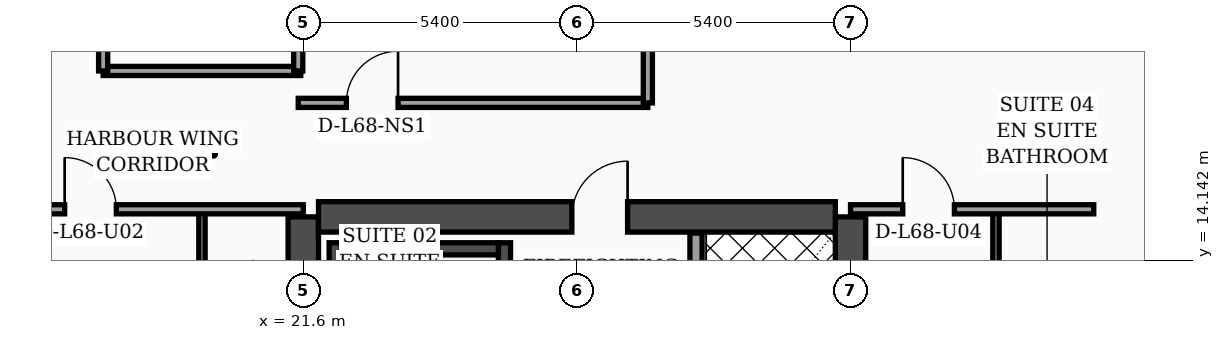
"""IFC4 building model, lengths in metres.
Left out: names, types, materials, properties, quantities, classifications, styles, units other than length and angle.
Written with IfcOpenShell. Run it as: python <this file> out.ifc"""

import sys

from ifc_helpers import new_model, si_unit, direction, frame, frame_2d, origin, place, context, subcontext, project, spatial, rectangle, extrude, element, fill, save


model = new_model("IFC4")
c1 = context("Model", 3, precision=1e-05, world=origin(), true_north=direction((0.0, 1.0)))
c2 = subcontext(c1, "Body", "Model", "MODEL_VIEW")
j1 = project(units=[si_unit("LENGTHUNIT", "METRE"), si_unit("PLANEANGLEUNIT", "RADIAN")], contexts=[c1])
p1 = place(None, origin())
s1 = spatial("IfcSite", under=j1, at=p1, CompositionType="ELEMENT")
p2 = place(p1, origin())
s2 = spatial("IfcBuilding", under=s1, at=p2, CompositionType="ELEMENT")
p3 = place(p2, frame((0.0, 0.0, 274.9)))
s3 = spatial("IfcBuildingStorey", under=s2, at=p3, CompositionType="ELEMENT", Elevation=274.9)
for number, where, z_axis, x_axis in (
    (1, (21.6, 4.6, 0.0), (0.0, 0.0, 1.0), (0.0, 1.0, 0.0)),
    (2, (32.4, 4.6, 0.0), (0.0, 0.0, 1.0), (0.0, 1.0, 0.0)),
):
    element("IfcWall", number, at=place(p3, frame(where, z_axis=z_axis, x_axis=x_axis)), inside=s3, PredefinedType="SHEAR", context=c2, shape_type="SweptSolid", body=[
        extrude(rectangle(XDim=10.4, YDim=0.6, at=frame_2d((5.2, 0.0))), origin(), (0.0, 0.0, 1.0), 3.56),
    ])
p4 = place(p3, frame((21.9, 15.0, 0.0), z_axis=(0.0, 0.0, 1.0), x_axis=(1.0, 0.0, 0.0)))
e3 = element("IfcWall", 3, at=p4, inside=s3, PredefinedType="SHEAR", context=c2, shape_type="SweptSolid", body=[
    extrude(rectangle(XDim=10.2, YDim=0.6, at=frame_2d((5.1, 0.0))), origin(), (0.0, 0.0, 1.0), 3.56),
])
p5 = place(p4, frame((5.0, 0.0, 0.0)))
e4 = element("IfcOpeningElement", 4, at=p5, cuts=e3, PredefinedType="OPENING", context=c2, shape_type="SweptSolid", body=[
    extrude(rectangle(XDim=1.1, YDim=2.2, at=frame_2d((0.55, 1.1))), frame((0.0, 0.31, 0.0), z_axis=(0.0, -1.0, 0.0), x_axis=(1.0, 0.0, 0.0)), (0.0, 0.0, 1.0), 0.62),
])
p6 = place(p3, frame((22.23, 4.9, 0.0), z_axis=(0.0, 0.0, 1.0), x_axis=(0.0, 1.0, 0.0)))
e5 = element("IfcWall", 5, at=p6, inside=s3, PredefinedType="SOLIDWALL", context=c2, shape_type="SweptSolid", body=[
    extrude(rectangle(XDim=9.59, YDim=0.24, at=frame_2d((4.795, 0.0))), origin(), (0.0, 0.0, 1.0), 3.56),
])
p7 = place(p3, frame((25.57, 4.9, 0.0), z_axis=(0.0, 0.0, 1.0), x_axis=(0.0, 1.0, 0.0)))
e6 = element("IfcWall", 6, at=p7, inside=s3, PredefinedType="SOLIDWALL", context=c2, shape_type="SweptSolid", body=[
    extrude(rectangle(XDim=9.59, YDim=0.24, at=frame_2d((4.795, 0.0))), origin(), (0.0, 0.0, 1.0), 3.56),
])
p8 = place(p7, frame((0.35, 0.0, 0.0)))
e7 = element("IfcOpeningElement", 7, at=p8, cuts=e6, PredefinedType="OPENING", context=c2, shape_type="SweptSolid", body=[
    extrude(rectangle(XDim=1.15, YDim=2.2, at=frame_2d((0.575, 1.1))), frame((0.0, 0.13, 0.0), z_axis=(0.0, -1.0, 0.0), x_axis=(1.0, 0.0, 0.0)), (0.0, 0.0, 1.0), 0.26),
])
p9 = place(p3, frame((22.35, 14.37, 0.0), z_axis=(0.0, 0.0, 1.0), x_axis=(1.0, 0.0, 0.0)))
e8 = element("IfcWall", 8, at=p9, inside=s3, PredefinedType="SOLIDWALL", context=c2, shape_type="SweptSolid", body=[
    extrude(rectangle(XDim=3.1, YDim=0.24, at=frame_2d((1.55, 0.0))), origin(), (0.0, 0.0, 1.0), 3.56),
])
p10 = place(p3, frame((43.83, 5.505, 0.0), z_axis=(0.0, 0.0, 1.0), x_axis=(-0.300509063924, 0.953778958931, 0.0)))
e9 = element("IfcWall", 9, at=p10, inside=s3, PredefinedType="SOLIDWALL", context=c2, shape_type="SweptSolid", body=[
    extrude(rectangle(XDim=30.814, YDim=0.32, at=frame_2d((15.407, 0.0))), origin(), (0.0, 0.0, 1.0), 3.56),
])
p11 = place(p10, frame((10.199, 0.0, 0.0)))
e10 = element("IfcOpeningElement", 10, at=p11, cuts=e9, PredefinedType="OPENING", context=c2, shape_type="SweptSolid", body=[
    extrude(rectangle(XDim=1.4, YDim=2.25, at=frame_2d((0.7, 1.125))), frame((0.0, 0.17, 0.0), z_axis=(0.0, -1.0, 0.0), x_axis=(1.0, 0.0, 0.0)), (0.0, 0.0, 1.0), 0.34),
])
p12 = place(p10, frame((4.437, 0.0, 0.7)))
e11 = element("IfcOpeningElement", 11, at=p12, cuts=e9, PredefinedType="OPENING", context=c2, shape_type="SweptSolid", body=[
    extrude(rectangle(XDim=1.6, YDim=1.65, at=frame_2d((0.8, 0.825))), frame((0.0, 0.17, 0.0), z_axis=(0.0, -1.0, 0.0), x_axis=(1.0, 0.0, 0.0)), (0.0, 0.0, 1.0), 0.34),
])
p13 = place(p10, frame((18.696, 0.0, 0.7)))
e12 = element("IfcOpeningElement", 12, at=p13, cuts=e9, PredefinedType="OPENING", context=c2, shape_type="SweptSolid", body=[
    extrude(rectangle(XDim=1.6, YDim=1.65, at=frame_2d((0.8, 0.825))), frame((0.0, 0.17, 0.0), z_axis=(0.0, -1.0, 0.0), x_axis=(1.0, 0.0, 0.0)), (0.0, 0.0, 1.0), 0.34),
])
p14 = place(p10, frame((1.6, 0.0, 0.75)))
e13 = element("IfcOpeningElement", 13, at=p14, cuts=e9, PredefinedType="OPENING", context=c2, shape_type="SweptSolid", body=[
    extrude(rectangle(XDim=1.5, YDim=1.6, at=frame_2d((0.75, 0.8))), frame((0.0, 0.17, 0.0), z_axis=(0.0, -1.0, 0.0), x_axis=(1.0, 0.0, 0.0)), (0.0, 0.0, 1.0), 0.34),
])
p15 = place(p10, frame((7.8, 0.0, 0.75)))
e14 = element("IfcOpeningElement", 14, at=p15, cuts=e9, PredefinedType="OPENING", context=c2, shape_type="SweptSolid", body=[
    extrude(rectangle(XDim=1.5, YDim=1.6, at=frame_2d((0.75, 0.8))), frame((0.0, 0.17, 0.0), z_axis=(0.0, -1.0, 0.0), x_axis=(1.0, 0.0, 0.0)), (0.0, 0.0, 1.0), 0.34),
])
p16 = place(p10, frame((14.0, 0.0, 0.75)))
e15 = element("IfcOpeningElement", 15, at=p16, cuts=e9, PredefinedType="OPENING", context=c2, shape_type="SweptSolid", body=[
    extrude(rectangle(XDim=1.5, YDim=1.6, at=frame_2d((0.75, 0.8))), frame((0.0, 0.17, 0.0), z_axis=(0.0, -1.0, 0.0), x_axis=(1.0, 0.0, 0.0)), (0.0, 0.0, 1.0), 0.34),
])
p17 = place(p10, frame((16.55, 0.0, 0.75)))
e16 = element("IfcOpeningElement", 16, at=p17, cuts=e9, PredefinedType="OPENING", context=c2, shape_type="SweptSolid", body=[
    extrude(rectangle(XDim=1.5, YDim=1.6, at=frame_2d((0.75, 0.8))), frame((0.0, 0.17, 0.0), z_axis=(0.0, -1.0, 0.0), x_axis=(1.0, 0.0, 0.0)), (0.0, 0.0, 1.0), 0.34),
])
p18 = place(p10, frame((20.75, 0.0, 0.75)))
e17 = element("IfcOpeningElement", 17, at=p18, cuts=e9, PredefinedType="OPENING", context=c2, shape_type="SweptSolid", body=[
    extrude(rectangle(XDim=1.5, YDim=1.6, at=frame_2d((0.75, 0.8))), frame((0.0, 0.17, 0.0), z_axis=(0.0, -1.0, 0.0), x_axis=(1.0, 0.0, 0.0)), (0.0, 0.0, 1.0), 0.34),
])
p19 = place(p10, frame((23.3, 0.0, 0.75)))
e18 = element("IfcOpeningElement", 18, at=p19, cuts=e9, PredefinedType="OPENING", context=c2, shape_type="SweptSolid", body=[
    extrude(rectangle(XDim=1.5, YDim=1.6, at=frame_2d((0.75, 0.8))), frame((0.0, 0.17, 0.0), z_axis=(0.0, -1.0, 0.0), x_axis=(1.0, 0.0, 0.0)), (0.0, 0.0, 1.0), 0.34),
])
p20 = place(p10, frame((26.4, 0.0, 0.75)))
e19 = element("IfcOpeningElement", 19, at=p20, cuts=e9, PredefinedType="OPENING", context=c2, shape_type="SweptSolid", body=[
    extrude(rectangle(XDim=1.5, YDim=1.6, at=frame_2d((0.75, 0.8))), frame((0.0, 0.17, 0.0), z_axis=(0.0, -1.0, 0.0), x_axis=(1.0, 0.0, 0.0)), (0.0, 0.0, 1.0), 0.34),
])
p21 = place(p3, frame((29.35, 4.92, 0.0), z_axis=(0.0, 0.0, 1.0), x_axis=(0.0, 1.0, 0.0)))
e20 = element("IfcWall", 20, at=p21, inside=s3, PredefinedType="SOLIDWALL", context=c2, shape_type="SweptSolid", body=[
    extrude(rectangle(XDim=9.76, YDim=0.24, at=frame_2d((4.88, 0.0))), origin(), (0.0, 0.0, 1.0), 3.56),
])
p22 = place(p21, frame((0.55, 0.0, 0.0)))
e21 = element("IfcOpeningElement", 21, at=p22, cuts=e20, PredefinedType="OPENING", context=c2, shape_type="SweptSolid", body=[
    extrude(rectangle(XDim=1.3, YDim=2.35, at=frame_2d((0.65, 1.175))), frame((0.0, 0.13, 0.0), z_axis=(0.0, -1.0, 0.0), x_axis=(1.0, 0.0, 0.0)), (0.0, 0.0, 1.0), 0.26),
])
p23 = place(p3, frame((19.6, 2.44, 0.0), z_axis=(0.0, 0.0, 1.0), x_axis=(0.0, 1.0, 0.0)))
e22 = element("IfcWall", 22, at=p23, inside=s3, PredefinedType="PARTITIONING", context=c2, shape_type="SweptSolid", body=[
    extrude(rectangle(XDim=12.71, YDim=0.125, at=frame_2d((6.355, 0.0))), origin(), (0.0, 0.0, 1.0), 2.59),
])
p24 = place(p23, frame((4.34, 0.0, 0.0)))
e23 = element("IfcOpeningElement", 23, at=p24, cuts=e22, PredefinedType="OPENING", context=c2, shape_type="SweptSolid", body=[
    extrude(rectangle(XDim=0.96, YDim=2.2, at=frame_2d((0.48, 1.1))), frame((0.0, 0.073, 0.0), z_axis=(0.0, -1.0, 0.0), x_axis=(1.0, 0.0, 0.0)), (0.0, 0.0, 1.0), 0.145),
])
p25 = place(p23, frame((10.18, 0.0, 0.0)))
e24 = element("IfcOpeningElement", 24, at=p25, cuts=e22, PredefinedType="OPENING", context=c2, shape_type="SweptSolid", body=[
    extrude(rectangle(XDim=0.9, YDim=2.15, at=frame_2d((0.45, 1.075))), frame((0.0, 0.073, 0.0), z_axis=(0.0, -1.0, 0.0), x_axis=(1.0, 0.0, 0.0)), (0.0, 0.0, 1.0), 0.145),
])
p26 = place(p3, frame((15.15, 15.15, 0.0), z_axis=(0.0, 0.0, 1.0), x_axis=(1.0, 0.0, 0.0)))
e25 = element("IfcWall", 25, at=p26, inside=s3, PredefinedType="PARTITIONING", context=c2, shape_type="SweptSolid", body=[
    extrude(rectangle(XDim=6.45, YDim=0.18, at=frame_2d((3.225, 0.0))), origin(), (0.0, 0.0, 1.0), 2.59),
])
p27 = place(p26, frame((1.74, 0.0, 0.0)))
e26 = element("IfcOpeningElement", 26, at=p27, cuts=e25, PredefinedType="OPENING", context=c2, shape_type="SweptSolid", body=[
    extrude(rectangle(XDim=1.02, YDim=2.2, at=frame_2d((0.51, 1.1))), frame((0.0, 0.1, 0.0), z_axis=(0.0, -1.0, 0.0), x_axis=(1.0, 0.0, 0.0)), (0.0, 0.0, 1.0), 0.2),
])
p28 = place(p3, frame((17.65, 17.88, 0.0), z_axis=(0.0, 0.0, 1.0), x_axis=(1.0, 0.0, 0.0)))
e27 = element("IfcWall", 27, at=p28, inside=s3, PredefinedType="PARTITIONING", context=c2, shape_type="SweptSolid", body=[
    extrude(rectangle(XDim=3.9, YDim=0.18, at=frame_2d((1.95, 0.0))), origin(), (0.0, 0.0, 1.0), 3.56),
])
p29 = place(p3, frame((21.5, 17.88, 0.0), z_axis=(0.0, 0.0, 1.0), x_axis=(0.0, 1.0, 0.0)))
e28 = element("IfcWall", 28, at=p29, inside=s3, PredefinedType="PARTITIONING", context=c2, shape_type="SweptSolid", body=[
    extrude(rectangle(XDim=6.44, YDim=0.18, at=frame_2d((3.22, 0.0))), origin(), (0.0, 0.0, 1.0), 3.09),
])
p30 = place(p3, frame((17.65, 17.88, 0.0), z_axis=(0.0, 0.0, 1.0), x_axis=(0.0, 1.0, 0.0)))
e29 = element("IfcWall", 29, at=p30, inside=s3, PredefinedType="PARTITIONING", context=c2, shape_type="SweptSolid", body=[
    extrude(rectangle(XDim=6.44, YDim=0.18, at=frame_2d((3.22, 0.0))), origin(), (0.0, 0.0, 1.0), 3.09),
])
p31 = place(p30, frame((0.65, 0.0, 0.0)))
e30 = element("IfcOpeningElement", 30, at=p31, cuts=e29, PredefinedType="OPENING", context=c2, shape_type="SweptSolid", body=[
    extrude(rectangle(XDim=0.98, YDim=2.15, at=frame_2d((0.49, 1.075))), frame((0.0, 0.1, 0.0), z_axis=(0.0, -1.0, 0.0), x_axis=(1.0, 0.0, 0.0)), (0.0, 0.0, 1.0), 0.2),
])
p32 = place(p30, frame((3.97, 0.0, 0.0)))
e31 = element("IfcOpeningElement", 31, at=p32, cuts=e29, PredefinedType="OPENING", context=c2, shape_type="SweptSolid", body=[
    extrude(rectangle(XDim=0.96, YDim=2.2, at=frame_2d((0.48, 1.1))), frame((0.0, 0.1, 0.0), z_axis=(0.0, -1.0, 0.0), x_axis=(1.0, 0.0, 0.0)), (0.0, 0.0, 1.0), 0.2),
])
p33 = place(p3, frame((35.27, 2.44, 0.0), z_axis=(0.0, 0.0, 1.0), x_axis=(0.0, 1.0, 0.0)))
e32 = element("IfcWall", 32, at=p33, inside=s3, PredefinedType="PARTITIONING", context=c2, shape_type="SweptSolid", body=[
    extrude(rectangle(XDim=12.71, YDim=0.125, at=frame_2d((6.355, 0.0))), origin(), (0.0, 0.0, 1.0), 2.99),
])
p34 = place(p33, frame((4.35, 0.0, 0.0)))
e33 = element("IfcOpeningElement", 33, at=p34, cuts=e32, PredefinedType="OPENING", context=c2, shape_type="SweptSolid", body=[
    extrude(rectangle(XDim=0.96, YDim=2.2, at=frame_2d((0.48, 1.1))), frame((0.0, 0.073, 0.0), z_axis=(0.0, -1.0, 0.0), x_axis=(1.0, 0.0, 0.0)), (0.0, 0.0, 1.0), 0.145),
])
p35 = place(p33, frame((10.21, 0.0, 0.0)))
e34 = element("IfcOpeningElement", 34, at=p35, cuts=e32, PredefinedType="OPENING", context=c2, shape_type="SweptSolid", body=[
    extrude(rectangle(XDim=0.9, YDim=2.15, at=frame_2d((0.45, 1.075))), frame((0.0, 0.073, 0.0), z_axis=(0.0, -1.0, 0.0), x_axis=(1.0, 0.0, 0.0)), (0.0, 0.0, 1.0), 0.145),
])
p36 = place(p3, frame((32.4, 15.15, 0.0), z_axis=(0.0, 0.0, 1.0), x_axis=(1.0, 0.0, 0.0)))
e35 = element("IfcWall", 35, at=p36, inside=s3, PredefinedType="PARTITIONING", context=c2, shape_type="SweptSolid", body=[
    extrude(rectangle(XDim=4.8, YDim=0.18, at=frame_2d((2.4, 0.0))), origin(), (0.0, 0.0, 1.0), 2.99),
])
p37 = place(p36, frame((1.03, 0.0, 0.0)))
e36 = element("IfcOpeningElement", 36, at=p37, cuts=e35, PredefinedType="OPENING", context=c2, shape_type="SweptSolid", body=[
    extrude(rectangle(XDim=1.02, YDim=2.2, at=frame_2d((0.51, 1.1))), frame((0.0, 0.1, 0.0), z_axis=(0.0, -1.0, 0.0), x_axis=(1.0, 0.0, 0.0)), (0.0, 0.0, 1.0), 0.2),
])
p38 = place(p3, frame((21.5, 17.25, 0.0), z_axis=(0.0, 0.0, 1.0), x_axis=(1.0, 0.0, 0.0)))
e37 = element("IfcWall", 37, at=p38, inside=s3, PredefinedType="PARTITIONING", context=c2, shape_type="SweptSolid", body=[
    extrude(rectangle(XDim=6.9, YDim=0.18, at=frame_2d((3.45, 0.0))), origin(), (0.0, 0.0, 1.0), 3.56),
])
p39 = place(p38, frame((0.95, 0.0, 0.0)))
e38 = element("IfcOpeningElement", 38, at=p39, cuts=e37, PredefinedType="OPENING", context=c2, shape_type="SweptSolid", body=[
    extrude(rectangle(XDim=1.02, YDim=2.2, at=frame_2d((0.51, 1.1))), frame((0.0, 0.1, 0.0), z_axis=(0.0, -1.0, 0.0), x_axis=(1.0, 0.0, 0.0)), (0.0, 0.0, 1.0), 0.2),
])
p40 = place(p3, frame((28.4, 17.25, 0.0), z_axis=(0.0, 0.0, 1.0), x_axis=(0.0, 1.0, 0.0)))
e39 = element("IfcWall", 39, at=p40, inside=s3, PredefinedType="PARTITIONING", context=c2, shape_type="SweptSolid", body=[
    extrude(rectangle(XDim=17.51, YDim=0.18, at=frame_2d((8.755, 0.0))), origin(), (0.0, 0.0, 1.0), 3.09),
])
p41 = place(p27, origin())
e40 = element("IfcDoor", 40, at=p41, inside=s3, OperationType="SINGLE_SWING_LEFT", PredefinedType="DOOR", context=c2, shape_type="SweptSolid", body=[
    extrude(rectangle(XDim=1.02, YDim=2.2, at=frame_2d((0.51, 1.1))), frame((0.0, 0.025, 0.0), z_axis=(0.0, -1.0, 0.0), x_axis=(1.0, 0.0, 0.0)), (0.0, 0.0, 1.0), 0.05),
])
fill(e26, e40)
p42 = place(p37, origin())
e41 = element("IfcDoor", 41, at=p42, inside=s3, OperationType="SINGLE_SWING_LEFT", PredefinedType="DOOR", context=c2, shape_type="SweptSolid", body=[
    extrude(rectangle(XDim=1.02, YDim=2.2, at=frame_2d((0.51, 1.1))), frame((0.0, 0.025, 0.0), z_axis=(0.0, -1.0, 0.0), x_axis=(1.0, 0.0, 0.0)), (0.0, 0.0, 1.0), 0.05),
])
fill(e36, e41)
p43 = place(p39, origin())
e42 = element("IfcDoor", 42, at=p43, inside=s3, OperationType="SINGLE_SWING_RIGHT", PredefinedType="DOOR", context=c2, shape_type="SweptSolid", body=[
    extrude(rectangle(XDim=1.02, YDim=2.2, at=frame_2d((0.51, 1.1))), frame((0.0, 0.025, 0.0), z_axis=(0.0, -1.0, 0.0), x_axis=(1.0, 0.0, 0.0)), (0.0, 0.0, 1.0), 0.05),
])
fill(e38, e42)
p44 = place(p5, origin())
e43 = element("IfcDoor", 43, at=p44, inside=s3, OperationType="SINGLE_SWING_RIGHT", PredefinedType="DOOR", context=c2, shape_type="SweptSolid", body=[
    extrude(rectangle(XDim=1.1, YDim=2.2, at=frame_2d((0.55, 1.1))), frame((0.0, 0.025, 0.0), z_axis=(0.0, -1.0, 0.0), x_axis=(1.0, 0.0, 0.0)), (0.0, 0.0, 1.0), 0.05),
])
fill(e4, e43)
save(model, sys.argv[1])
